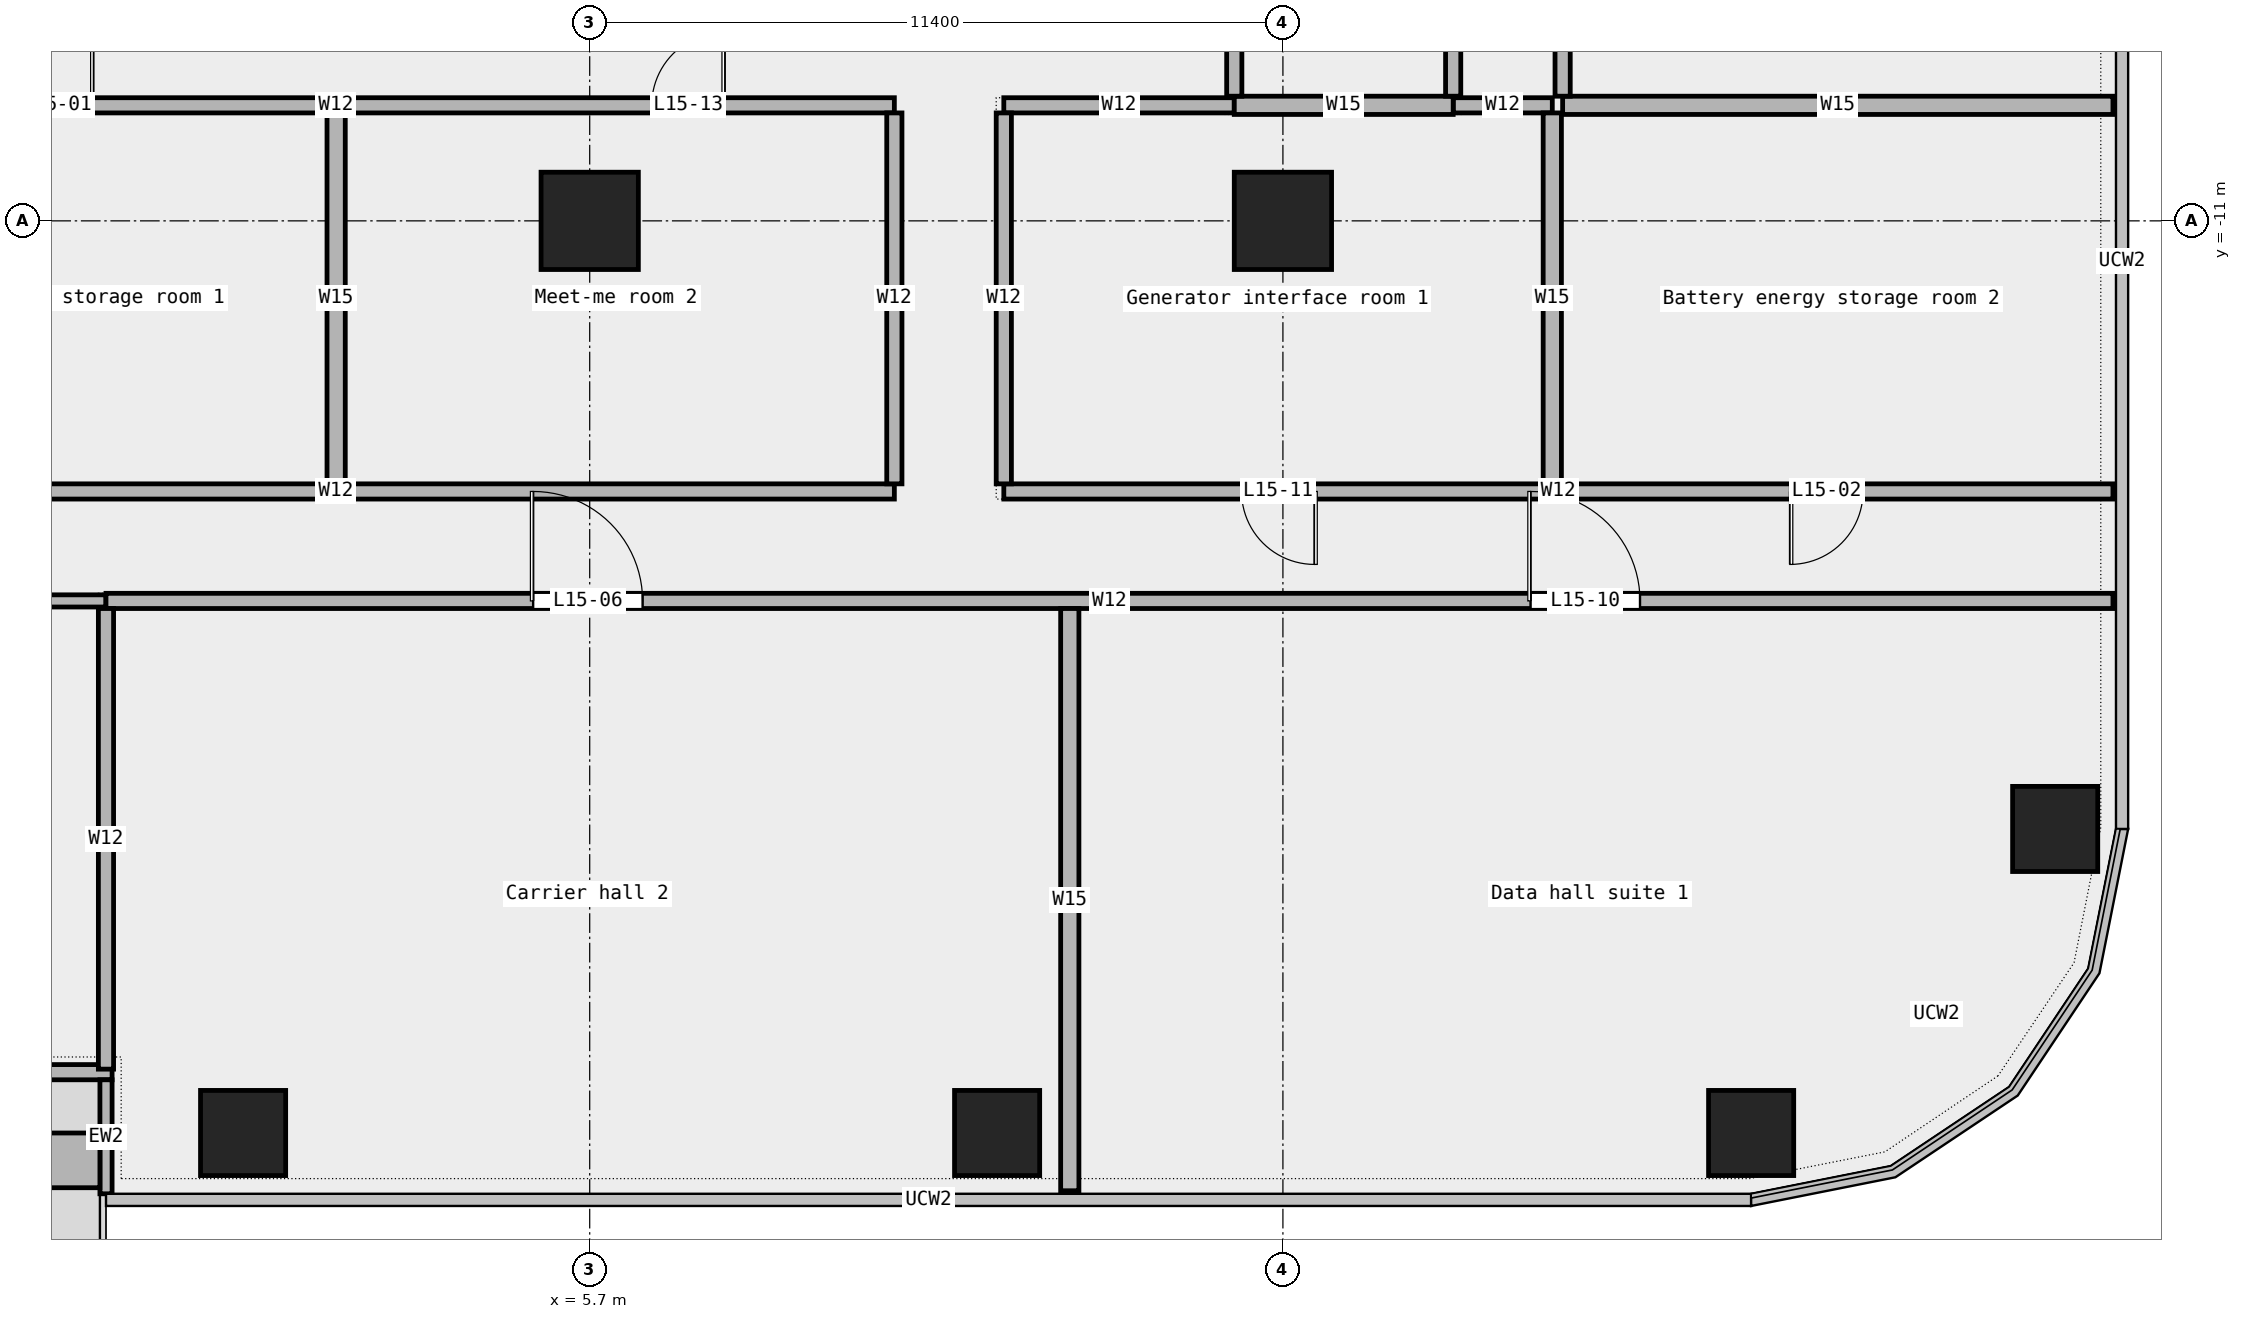
"""IFC4 building model, lengths in metres.
Left out: names, types, materials, properties, quantities, classifications, styles, units other than length and angle.
Written with IfcOpenShell. Run it as: python <this file> out.ifc"""

import sys

from ifc_helpers import new_model, si_unit, direction, frame, frame_2d, origin, origin_2d, place, context, subcontext, project, spatial, rectangle, extrude, element, fill, save


model = new_model("IFC4")
c1 = context("Model", 3, precision=1e-05, world=origin(), true_north=direction((0.0, 1.0)))
c2 = subcontext(c1, "Body", "Model", "MODEL_VIEW")
j1 = project(units=[si_unit("LENGTHUNIT", "METRE"), si_unit("PLANEANGLEUNIT", "RADIAN")], contexts=[c1])
p1 = place(None, origin())
s1 = spatial("IfcSite", under=j1, at=p1, CompositionType="ELEMENT")
p2 = place(p1, origin())
s2 = spatial("IfcBuilding", under=s1, at=p2, CompositionType="ELEMENT")
p3 = place(p2, frame((0.0, 0.0, 79.0)))
s3 = spatial("IfcBuildingStorey", under=s2, at=p3, CompositionType="ELEMENT", Elevation=79.0)
for number, where, z_axis, x_axis in (
    (1, (0.0, -26.0, 0.0), (0.0, 0.0, 1.0), (1.0, 0.0, 0.0)),
    (2, (12.4, -26.0, 0.0), (0.0, 0.0, 1.0), (1.0, 0.0, 0.0)),
    (3, (24.8, -26.0, 0.0), (0.0, 0.0, 1.0), (1.0, 0.0, 0.0)),
    (4, (29.8, -21.0, 0.0), (0.0, 0.0, 1.0), (1.0, 0.0, 0.0)),
):
    element("IfcColumn", number, at=place(p3, frame(where, z_axis=z_axis, x_axis=x_axis)), inside=s3, PredefinedType="COLUMN", context=c2, shape_type="SweptSolid", body=[
        extrude(rectangle(XDim=1.4, YDim=1.4, at=origin_2d()), origin(), (0.0, 0.0, 1.0), 4.35),
    ])
for number, where, z_axis, x_axis in (
    (5, (5.7, -11.0, 0.0), (0.0, 0.0, 1.0), (1.0, 0.0, 0.0)),
    (6, (17.1, -11.0, 0.0), (0.0, 0.0, 1.0), (1.0, 0.0, 0.0)),
):
    element("IfcColumn", number, at=place(p3, frame(where, z_axis=z_axis, x_axis=x_axis)), inside=s3, PredefinedType="COLUMN", context=c2, shape_type="SweptSolid", body=[
        extrude(rectangle(XDim=1.6, YDim=1.6, at=origin_2d()), origin(), (0.0, 0.0, 1.0), 4.35),
    ])
p4 = place(p3, frame((-15.882, -25.0, 0.0), z_axis=(0.0, 0.0, 1.0), x_axis=(1.0, 0.0, 0.0)))
e7 = element("IfcWall", 7, at=p4, inside=s3, PredefinedType="STANDARD", context=c2, shape_type="SweptSolid", body=[
    extrude(rectangle(XDim=13.727, YDim=0.25, at=frame_2d((6.864, 0.0))), origin(), (0.0, 0.0, 1.0), 4.35),
])
p5 = place(p4, frame((1.0, 0.0, 0.45)))
e8 = element("IfcOpeningElement", 8, at=p5, cuts=e7, PredefinedType="OPENING", context=c2, shape_type="SweptSolid", body=[
    extrude(rectangle(XDim=1.5, YDim=3.0, at=frame_2d((0.75, 1.5))), frame((0.0, 0.137, 0.0), z_axis=(0.0, -1.0, 0.0), x_axis=(1.0, 0.0, 0.0)), (0.0, 0.0, 1.0), 0.274),
])
p6 = place(p4, frame((6.0, 0.0, 0.0)))
e9 = element("IfcOpeningElement", 9, at=p6, cuts=e7, PredefinedType="OPENING", context=c2, shape_type="SweptSolid", body=[
    extrude(rectangle(XDim=1.8, YDim=2.4, at=frame_2d((0.9, 1.2))), frame((0.0, 0.137, 0.0), z_axis=(0.0, -1.0, 0.0), x_axis=(1.0, 0.0, 0.0)), (0.0, 0.0, 1.0), 0.274),
])
p7 = place(p4, frame((10.5, 0.0, 0.45)))
e10 = element("IfcOpeningElement", 10, at=p7, cuts=e7, PredefinedType="OPENING", context=c2, shape_type="SweptSolid", body=[
    extrude(rectangle(XDim=1.5, YDim=3.0, at=frame_2d((0.75, 1.5))), frame((0.0, 0.137, 0.0), z_axis=(0.0, -1.0, 0.0), x_axis=(1.0, 0.0, 0.0)), (0.0, 0.0, 1.0), 0.274),
])
p8 = place(p3, frame((-2.255, -27.0, 0.0), z_axis=(0.0, 0.0, 1.0), x_axis=(0.0, 1.0, 0.0)))
e11 = element("IfcWall", 11, at=p8, inside=s3, PredefinedType="STANDARD", context=c2, shape_type="SweptSolid", body=[
    extrude(rectangle(XDim=1.875, YDim=0.2, at=frame_2d((0.938, 0.0))), origin(), (0.0, 0.0, 1.0), 4.35),
])
p9 = place(p3, frame((-5.955, -26.45, 0.0), z_axis=(0.0, 0.0, 1.0), x_axis=(1.0, 0.0, 0.0)))
e12 = element("IfcWall", 12, at=p9, inside=s3, PredefinedType="STANDARD", context=c2, shape_type="SweptSolid", body=[
    extrude(rectangle(XDim=3.6, YDim=0.9, at=frame_2d((1.8, 0.0))), origin(), (0.0, 0.0, 1.0), 0.7),
])
p10 = place(p3, frame((-15.78, -17.25, 0.0), z_axis=(0.0, 0.0, 1.0), x_axis=(1.0, 0.0, 0.0)))
e13 = element("IfcWall", 13, at=p10, inside=s3, PredefinedType="PARTITIONING", context=c2, shape_type="SweptSolid", body=[
    extrude(rectangle(XDim=13.525, YDim=0.2, at=frame_2d((6.763, 0.0))), origin(), (0.0, 0.0, 1.0), 4.35),
])
p11 = place(p10, frame((6.012, 0.0, 0.0)))
e14 = element("IfcOpeningElement", 14, at=p11, cuts=e13, PredefinedType="OPENING", context=c2, shape_type="SweptSolid", body=[
    extrude(rectangle(XDim=1.5, YDim=2.1, at=frame_2d((0.75, 1.05))), frame((0.0, 0.112, 0.0), z_axis=(0.0, -1.0, 0.0), x_axis=(1.0, 0.0, 0.0)), (0.0, 0.0, 1.0), 0.224),
])
p12 = place(p3, frame((-2.255, -17.25, 0.0), z_axis=(0.0, 0.0, 1.0), x_axis=(1.0, 0.0, 0.0)))
e15 = element("IfcWall", 15, at=p12, inside=s3, PredefinedType="PARTITIONING", context=c2, shape_type="SweptSolid", body=[
    extrude(rectangle(XDim=33.005, YDim=0.25, at=frame_2d((16.502, 0.0))), origin(), (0.0, 0.0, 1.0), 4.35),
])
p13 = place(p12, frame((7.025, 0.0, 0.0)))
e16 = element("IfcOpeningElement", 16, at=p13, cuts=e15, PredefinedType="OPENING", context=c2, shape_type="SweptSolid", body=[
    extrude(rectangle(XDim=1.8, YDim=2.1, at=frame_2d((0.9, 1.05))), frame((0.0, 0.137, 0.0), z_axis=(0.0, -1.0, 0.0), x_axis=(1.0, 0.0, 0.0)), (0.0, 0.0, 1.0), 0.274),
])
p14 = place(p12, frame((23.427, 0.0, 0.0)))
e17 = element("IfcOpeningElement", 17, at=p14, cuts=e15, PredefinedType="OPENING", context=c2, shape_type="SweptSolid", body=[
    extrude(rectangle(XDim=1.8, YDim=2.1, at=frame_2d((0.9, 1.05))), frame((0.0, 0.137, 0.0), z_axis=(0.0, -1.0, 0.0), x_axis=(1.0, 0.0, 0.0)), (0.0, 0.0, 1.0), 0.274),
])
p15 = place(p3, frame((-7.655, -15.45, 0.0), z_axis=(0.0, 0.0, 1.0), x_axis=(1.0, 0.0, 0.0)))
e18 = element("IfcWall", 18, at=p15, inside=s3, PredefinedType="PARTITIONING", context=c2, shape_type="SweptSolid", body=[
    extrude(rectangle(XDim=18.365, YDim=0.25, at=frame_2d((9.183, 0.0))), origin(), (0.0, 0.0, 1.0), 4.35),
])
p16 = place(p3, frame((12.51, -15.45, 0.0), z_axis=(0.0, 0.0, 1.0), x_axis=(1.0, 0.0, 0.0)))
e19 = element("IfcWall", 19, at=p16, inside=s3, PredefinedType="PARTITIONING", context=c2, shape_type="SweptSolid", body=[
    extrude(rectangle(XDim=18.24, YDim=0.25, at=frame_2d((9.12, 0.0))), origin(), (0.0, 0.0, 1.0), 4.35),
])
p17 = place(p16, frame((12.93, 0.0, 0.0)))
e20 = element("IfcOpeningElement", 20, at=p17, cuts=e19, PredefinedType="OPENING", context=c2, shape_type="SweptSolid", body=[
    extrude(rectangle(XDim=1.2, YDim=2.1, at=frame_2d((0.6, 1.05))), frame((0.0, 0.137, 0.0), z_axis=(0.0, -1.0, 0.0), x_axis=(1.0, 0.0, 0.0)), (0.0, 0.0, 1.0), 0.274),
])
p18 = place(p16, frame((3.91, 0.0, 0.0)))
e21 = element("IfcOpeningElement", 21, at=p18, cuts=e19, PredefinedType="OPENING", context=c2, shape_type="SweptSolid", body=[
    extrude(rectangle(XDim=1.2, YDim=2.1, at=frame_2d((0.6, 1.05))), frame((0.0, 0.137, 0.0), z_axis=(0.0, -1.0, 0.0), x_axis=(1.0, 0.0, 0.0)), (0.0, 0.0, 1.0), 0.274),
])
p19 = place(p3, frame((-7.655, -9.1, 0.0), z_axis=(0.0, 0.0, 1.0), x_axis=(1.0, 0.0, 0.0)))
e22 = element("IfcWall", 22, at=p19, inside=s3, PredefinedType="PARTITIONING", context=c2, shape_type="SweptSolid", body=[
    extrude(rectangle(XDim=18.365, YDim=0.25, at=frame_2d((9.183, 0.0))), origin(), (0.0, 0.0, 1.0), 4.35),
])
p20 = place(p19, frame((3.992, 0.0, 0.0)))
e23 = element("IfcOpeningElement", 23, at=p20, cuts=e22, PredefinedType="OPENING", context=c2, shape_type="SweptSolid", body=[
    extrude(rectangle(XDim=1.2, YDim=2.1, at=frame_2d((0.6, 1.05))), frame((0.0, 0.137, 0.0), z_axis=(0.0, -1.0, 0.0), x_axis=(1.0, 0.0, 0.0)), (0.0, 0.0, 1.0), 0.274),
])
p21 = place(p19, frame((14.375, 0.0, 0.0)))
e24 = element("IfcOpeningElement", 24, at=p21, cuts=e22, PredefinedType="OPENING", context=c2, shape_type="SweptSolid", body=[
    extrude(rectangle(XDim=1.2, YDim=2.1, at=frame_2d((0.6, 1.05))), frame((0.0, 0.137, 0.0), z_axis=(0.0, -1.0, 0.0), x_axis=(1.0, 0.0, 0.0)), (0.0, 0.0, 1.0), 0.274),
])
p22 = place(p3, frame((12.51, -9.1, 0.0), z_axis=(0.0, 0.0, 1.0), x_axis=(1.0, 0.0, 0.0)))
e25 = element("IfcWall", 25, at=p22, inside=s3, PredefinedType="PARTITIONING", context=c2, shape_type="SweptSolid", body=[
    extrude(rectangle(XDim=3.79, YDim=0.25, at=frame_2d((1.895, 0.0))), origin(), (0.0, 0.0, 1.0), 4.35),
])
p23 = place(p3, frame((19.9, -9.1, 0.0), z_axis=(0.0, 0.0, 1.0), x_axis=(1.0, 0.0, 0.0)))
e26 = element("IfcWall", 26, at=p23, inside=s3, PredefinedType="PARTITIONING", context=c2, shape_type="SweptSolid", body=[
    extrude(rectangle(XDim=1.63, YDim=0.25, at=frame_2d((0.815, 0.0))), origin(), (0.0, 0.0, 1.0), 4.35),
])
p24 = place(p3, frame((16.3, -9.1, 0.0), z_axis=(0.0, 0.0, 1.0), x_axis=(1.0, 0.0, 0.0)))
e27 = element("IfcWall", 27, at=p24, inside=s3, PredefinedType="PARTITIONING", context=c2, shape_type="SweptSolid", body=[
    extrude(rectangle(XDim=3.6, YDim=0.3, at=frame_2d((1.8, 0.0))), origin(), (0.0, 0.0, 1.0), 4.35),
])
p25 = place(p3, frame((21.7, -9.1, 0.0), z_axis=(0.0, 0.0, 1.0), x_axis=(1.0, 0.0, 0.0)))
e28 = element("IfcWall", 28, at=p25, inside=s3, PredefinedType="PARTITIONING", context=c2, shape_type="SweptSolid", body=[
    extrude(rectangle(XDim=9.05, YDim=0.3, at=frame_2d((4.525, 0.0))), origin(), (0.0, 0.0, 1.0), 4.35),
])
p26 = place(p3, frame((-2.255, -24.95, 0.0), z_axis=(0.0, 0.0, 1.0), x_axis=(0.0, 1.0, 0.0)))
e29 = element("IfcWall", 29, at=p26, inside=s3, PredefinedType="PARTITIONING", context=c2, shape_type="SweptSolid", body=[
    extrude(rectangle(XDim=7.575, YDim=0.25, at=frame_2d((3.788, 0.0))), origin(), (0.0, 0.0, 1.0), 4.35),
])
p27 = place(p3, frame((1.53, -15.325, 0.0), z_axis=(0.0, 0.0, 1.0), x_axis=(0.0, 1.0, 0.0)))
e30 = element("IfcWall", 30, at=p27, inside=s3, PredefinedType="PARTITIONING", context=c2, shape_type="SweptSolid", body=[
    extrude(rectangle(XDim=6.1, YDim=0.3, at=frame_2d((3.05, 0.0))), origin(), (0.0, 0.0, 1.0), 4.35),
])
for number, where, z_axis, x_axis in (
    (31, (10.71, -15.325, 0.0), (0.0, 0.0, 1.0), (0.0, 1.0, 0.0)),
    (32, (12.51, -15.325, 0.0), (0.0, 0.0, 1.0), (0.0, 1.0, 0.0)),
):
    element("IfcWall", number, at=place(p3, frame(where, z_axis=z_axis, x_axis=x_axis)), inside=s3, PredefinedType="PARTITIONING", context=c2, shape_type="SweptSolid", body=[
        extrude(rectangle(XDim=6.1, YDim=0.25, at=frame_2d((3.05, 0.0))), origin(), (0.0, 0.0, 1.0), 4.35),
    ])
p28 = place(p3, frame((13.595, -26.95, 0.0), z_axis=(0.0, 0.0, 1.0), x_axis=(0.0, 1.0, 0.0)))
e33 = element("IfcWall", 33, at=p28, inside=s3, PredefinedType="PARTITIONING", context=c2, shape_type="SweptSolid", body=[
    extrude(rectangle(XDim=9.575, YDim=0.3, at=frame_2d((4.788, 0.0))), origin(), (0.0, 0.0, 1.0), 4.35),
])
p29 = place(p3, frame((16.3, -8.95, 0.0), z_axis=(0.0, 0.0, 1.0), x_axis=(0.0, 1.0, 0.0)))
e34 = element("IfcWall", 34, at=p29, inside=s3, PredefinedType="PARTITIONING", context=c2, shape_type="SweptSolid", body=[
    extrude(rectangle(XDim=8.15, YDim=0.25, at=frame_2d((4.075, 0.0))), origin(), (0.0, 0.0, 1.0), 4.35),
])
p30 = place(p3, frame((19.9, -8.95, 0.0), z_axis=(0.0, 0.0, 1.0), x_axis=(0.0, 1.0, 0.0)))
e35 = element("IfcWall", 35, at=p30, inside=s3, PredefinedType="PARTITIONING", context=c2, shape_type="SweptSolid", body=[
    extrude(rectangle(XDim=9.875, YDim=0.25, at=frame_2d((4.938, 0.0))), origin(), (0.0, 0.0, 1.0), 4.35),
])
p31 = place(p30, frame((4.488, 0.0, 0.0)))
e36 = element("IfcOpeningElement", 36, at=p31, cuts=e35, PredefinedType="OPENING", context=c2, shape_type="SweptSolid", body=[
    extrude(rectangle(XDim=0.9, YDim=2.1, at=frame_2d((0.45, 1.05))), frame((0.0, 0.137, 0.0), z_axis=(0.0, -1.0, 0.0), x_axis=(1.0, 0.0, 0.0)), (0.0, 0.0, 1.0), 0.274),
])
p32 = place(p3, frame((21.53, -15.325, 0.0), z_axis=(0.0, 0.0, 1.0), x_axis=(0.0, 1.0, 0.0)))
e37 = element("IfcWall", 37, at=p32, inside=s3, PredefinedType="PARTITIONING", context=c2, shape_type="SweptSolid", body=[
    extrude(rectangle(XDim=6.1, YDim=0.3, at=frame_2d((3.05, 0.0))), origin(), (0.0, 0.0, 1.0), 4.35),
])
p33 = place(p3, frame((21.7, -8.95, 0.0), z_axis=(0.0, 0.0, 1.0), x_axis=(0.0, 1.0, 0.0)))
e38 = element("IfcWall", 38, at=p33, inside=s3, PredefinedType="PARTITIONING", context=c2, shape_type="SweptSolid", body=[
    extrude(rectangle(XDim=6.49, YDim=0.25, at=frame_2d((3.245, 0.0))), origin(), (0.0, 0.0, 1.0), 4.35),
])
p34 = place(p33, frame((2.645, 0.0, 0.0)))
e39 = element("IfcOpeningElement", 39, at=p34, cuts=e38, PredefinedType="OPENING", context=c2, shape_type="SweptSolid", body=[
    extrude(rectangle(XDim=1.2, YDim=2.1, at=frame_2d((0.6, 1.05))), frame((0.0, 0.137, 0.0), z_axis=(0.0, -1.0, 0.0), x_axis=(1.0, 0.0, 0.0)), (0.0, 0.0, 1.0), 0.274),
])
p35 = place(p20, origin())
e40 = element("IfcDoor", 40, at=p35, inside=s3, OperationType="SINGLE_SWING_RIGHT", PredefinedType="DOOR", context=c2, shape_type="SweptSolid", body=[
    extrude(rectangle(XDim=1.2, YDim=2.1, at=frame_2d((0.6, 1.05))), frame((0.0, 0.025, 0.0), z_axis=(0.0, -1.0, 0.0), x_axis=(1.0, 0.0, 0.0)), (0.0, 0.0, 1.0), 0.05),
])
fill(e23, e40)
p36 = place(p17, origin())
e41 = element("IfcDoor", 41, at=p36, inside=s3, OperationType="SINGLE_SWING_RIGHT", PredefinedType="DOOR", context=c2, shape_type="SweptSolid", body=[
    extrude(rectangle(XDim=1.2, YDim=2.1, at=frame_2d((0.6, 1.05))), frame((0.0, 0.025, 0.0), z_axis=(0.0, -1.0, 0.0), x_axis=(1.0, 0.0, 0.0)), (0.0, 0.0, 1.0), 0.05),
])
fill(e20, e41)
p37 = place(p13, origin())
e42 = element("IfcDoor", 42, at=p37, inside=s3, OperationType="DOUBLE_DOOR_SINGLE_SWING", PredefinedType="DOOR", context=c2, shape_type="SweptSolid", body=[
    extrude(rectangle(XDim=1.8, YDim=2.1, at=frame_2d((0.9, 1.05))), frame((0.0, 0.025, 0.0), z_axis=(0.0, -1.0, 0.0), x_axis=(1.0, 0.0, 0.0)), (0.0, 0.0, 1.0), 0.05),
])
fill(e16, e42)
p38 = place(p14, origin())
e43 = element("IfcDoor", 43, at=p38, inside=s3, OperationType="DOUBLE_DOOR_SINGLE_SWING", PredefinedType="DOOR", context=c2, shape_type="SweptSolid", body=[
    extrude(rectangle(XDim=1.8, YDim=2.1, at=frame_2d((0.9, 1.05))), frame((0.0, 0.025, 0.0), z_axis=(0.0, -1.0, 0.0), x_axis=(1.0, 0.0, 0.0)), (0.0, 0.0, 1.0), 0.05),
])
fill(e17, e43)
p39 = place(p18, origin())
e44 = element("IfcDoor", 44, at=p39, inside=s3, OperationType="SINGLE_SWING_LEFT", PredefinedType="DOOR", context=c2, shape_type="SweptSolid", body=[
    extrude(rectangle(XDim=1.2, YDim=2.1, at=frame_2d((0.6, 1.05))), frame((0.0, 0.025, 0.0), z_axis=(0.0, -1.0, 0.0), x_axis=(1.0, 0.0, 0.0)), (0.0, 0.0, 1.0), 0.05),
])
fill(e21, e44)
p40 = place(p21, origin())
e45 = element("IfcDoor", 45, at=p40, inside=s3, OperationType="SINGLE_SWING_RIGHT", PredefinedType="DOOR", context=c2, shape_type="SweptSolid", body=[
    extrude(rectangle(XDim=1.2, YDim=2.1, at=frame_2d((0.6, 1.05))), frame((0.0, 0.025, 0.0), z_axis=(0.0, -1.0, 0.0), x_axis=(1.0, 0.0, 0.0)), (0.0, 0.0, 1.0), 0.05),
])
fill(e24, e45)
save(model, sys.argv[1])
